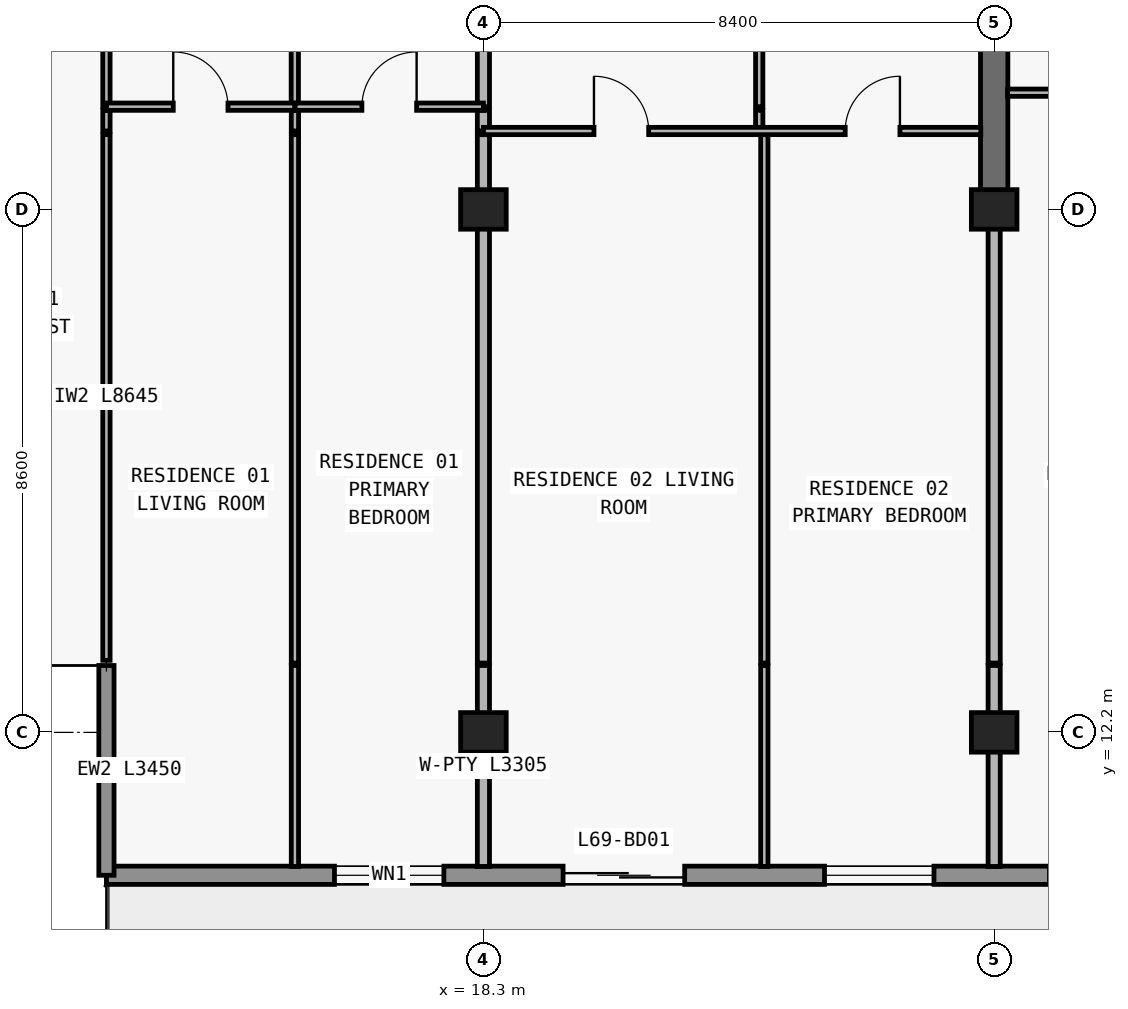
"""IFC4 building model, lengths in metres.
Left out: names, types, materials, properties, quantities, classifications, styles, units other than length and angle.
Written with IfcOpenShell. Run it as: python <this file> out.ifc"""

import sys

from ifc_helpers import new_model, si_unit, direction, frame, frame_2d, origin, origin_2d, place, context, subcontext, project, spatial, rectangle, extrude, element, fill, save


model = new_model("IFC4")
c1 = context("Model", 3, precision=1e-05, world=origin(), true_north=direction((0.0, 1.0)))
c2 = subcontext(c1, "Body", "Model", "MODEL_VIEW")
j1 = project(units=[si_unit("LENGTHUNIT", "METRE"), si_unit("PLANEANGLEUNIT", "RADIAN")], contexts=[c1])
p1 = place(None, origin())
s1 = spatial("IfcSite", under=j1, at=p1, CompositionType="ELEMENT")
p2 = place(p1, origin())
s2 = spatial("IfcBuilding", under=s1, at=p2, CompositionType="ELEMENT")
p3 = place(p2, frame((0.0, 0.0, 246.3)))
s3 = spatial("IfcBuildingStorey", under=s2, at=p3, CompositionType="ELEMENT", Elevation=246.3)
for number, where, z_axis, x_axis in (
    (1, (18.3, 12.2, 0.0), (0.0, 0.0, 1.0), (1.0, 0.0, 0.0)),
    (2, (26.7, 12.2, 0.0), (0.0, 0.0, 1.0), (1.0, 0.0, 0.0)),
    (3, (18.3, 20.8, 0.0), (0.0, 0.0, 1.0), (1.0, 0.0, 0.0)),
    (4, (26.7, 20.8, 0.0), (0.0, 0.0, 1.0), (1.0, 0.0, 0.0)),
):
    element("IfcColumn", number, at=place(p3, frame(where, z_axis=z_axis, x_axis=x_axis)), inside=s3, PredefinedType="COLUMN", context=c2, shape_type="SweptSolid", body=[
        extrude(rectangle(XDim=0.75, YDim=0.65, at=origin_2d()), origin(), (0.0, 0.0, 1.0), 3.05),
    ])
p4 = place(p3, frame((26.7, 20.8, 0.0), z_axis=(0.0, 0.0, 1.0), x_axis=(0.0, 1.0, 0.0)))
e5 = element("IfcWall", 5, at=p4, inside=s3, PredefinedType="SHEAR", context=c2, shape_type="SweptSolid", body=[
    extrude(rectangle(XDim=8.6, YDim=0.45, at=frame_2d((4.3, 0.0))), origin(), (0.0, 0.0, 1.0), 3.05),
])
p5 = place(p3, frame((65.7, 9.85, 0.0), z_axis=(0.0, 0.0, 1.0), x_axis=(-1.0, 0.0, 0.0)))
e6 = element("IfcWall", 6, at=p5, inside=s3, PredefinedType="STANDARD", context=c2, shape_type="SweptSolid", body=[
    extrude(rectangle(XDim=53.6, YDim=0.3, at=frame_2d((26.8, 0.0))), origin(), (0.0, 0.0, 1.0), 3.05),
])
p6 = place(p5, frame((48.05, 0.0, 0.85)))
e7 = element("IfcOpeningElement", 7, at=p6, cuts=e6, PredefinedType="OPENING", context=c2, shape_type="SweptSolid", body=[
    extrude(rectangle(XDim=1.8, YDim=1.55, at=frame_2d((0.9, 0.775))), frame((0.0, 0.16, 0.0), z_axis=(0.0, -1.0, 0.0), x_axis=(1.0, 0.0, 0.0)), (0.0, 0.0, 1.0), 0.32),
])
p7 = place(p5, frame((44.09, 0.0, 0.0)))
e8 = element("IfcOpeningElement", 8, at=p7, cuts=e6, PredefinedType="OPENING", context=c2, shape_type="SweptSolid", body=[
    extrude(rectangle(XDim=2.0, YDim=2.3, at=frame_2d((1.0, 1.15))), frame((0.0, 0.16, 0.0), z_axis=(0.0, -1.0, 0.0), x_axis=(1.0, 0.0, 0.0)), (0.0, 0.0, 1.0), 0.32),
])
p8 = place(p5, frame((39.99, 0.0, 0.85)))
e9 = element("IfcOpeningElement", 9, at=p8, cuts=e6, PredefinedType="OPENING", context=c2, shape_type="SweptSolid", body=[
    extrude(rectangle(XDim=1.8, YDim=1.55, at=frame_2d((0.9, 0.775))), frame((0.0, 0.16, 0.0), z_axis=(0.0, -1.0, 0.0), x_axis=(1.0, 0.0, 0.0)), (0.0, 0.0, 1.0), 0.32),
])
p9 = place(p5, frame((36.09, 0.0, 0.0)))
e10 = element("IfcOpeningElement", 10, at=p9, cuts=e6, PredefinedType="OPENING", context=c2, shape_type="SweptSolid", body=[
    extrude(rectangle(XDim=2.0, YDim=2.3, at=frame_2d((1.0, 1.15))), frame((0.0, 0.16, 0.0), z_axis=(0.0, -1.0, 0.0), x_axis=(1.0, 0.0, 0.0)), (0.0, 0.0, 1.0), 0.32),
])
p10 = place(p5, frame((31.41, 0.0, 0.65)))
e11 = element("IfcOpeningElement", 11, at=p10, cuts=e6, PredefinedType="OPENING", context=c2, shape_type="SweptSolid", body=[
    extrude(rectangle(XDim=2.6, YDim=1.85, at=frame_2d((1.3, 0.925))), frame((0.0, 0.16, 0.0), z_axis=(0.0, -1.0, 0.0), x_axis=(1.0, 0.0, 0.0)), (0.0, 0.0, 1.0), 0.32),
])
p11 = place(p5, frame((25.7, 0.0, 0.85)))
e12 = element("IfcOpeningElement", 12, at=p11, cuts=e6, PredefinedType="OPENING", context=c2, shape_type="SweptSolid", body=[
    extrude(rectangle(XDim=2.2, YDim=1.55, at=frame_2d((1.1, 0.775))), frame((0.0, 0.16, 0.0), z_axis=(0.0, -1.0, 0.0), x_axis=(1.0, 0.0, 0.0)), (0.0, 0.0, 1.0), 0.32),
])
p12 = place(p5, frame((17.7, 0.0, 0.85)))
e13 = element("IfcOpeningElement", 13, at=p12, cuts=e6, PredefinedType="OPENING", context=c2, shape_type="SweptSolid", body=[
    extrude(rectangle(XDim=2.2, YDim=1.55, at=frame_2d((1.1, 0.775))), frame((0.0, 0.16, 0.0), z_axis=(0.0, -1.0, 0.0), x_axis=(1.0, 0.0, 0.0)), (0.0, 0.0, 1.0), 0.32),
])
p13 = place(p5, frame((11.29, 0.0, 0.0)))
e14 = element("IfcOpeningElement", 14, at=p13, cuts=e6, PredefinedType="OPENING", context=c2, shape_type="SweptSolid", body=[
    extrude(rectangle(XDim=2.0, YDim=2.3, at=frame_2d((1.0, 1.15))), frame((0.0, 0.16, 0.0), z_axis=(0.0, -1.0, 0.0), x_axis=(1.0, 0.0, 0.0)), (0.0, 0.0, 1.0), 0.32),
])
p14 = place(p5, frame((7.19, 0.0, 0.85)))
e15 = element("IfcOpeningElement", 15, at=p14, cuts=e6, PredefinedType="OPENING", context=c2, shape_type="SweptSolid", body=[
    extrude(rectangle(XDim=1.8, YDim=1.55, at=frame_2d((0.9, 0.775))), frame((0.0, 0.16, 0.0), z_axis=(0.0, -1.0, 0.0), x_axis=(1.0, 0.0, 0.0)), (0.0, 0.0, 1.0), 0.32),
])
p15 = place(p5, frame((0.65, 0.0, 0.85)))
e16 = element("IfcOpeningElement", 16, at=p15, cuts=e6, PredefinedType="OPENING", context=c2, shape_type="SweptSolid", body=[
    extrude(rectangle(XDim=1.8, YDim=1.55, at=frame_2d((0.9, 0.775))), frame((0.0, 0.16, 0.0), z_axis=(0.0, -1.0, 0.0), x_axis=(1.0, 0.0, 0.0)), (0.0, 0.0, 1.0), 0.32),
])
p16 = place(p3, frame((12.1, 13.3, 0.0), z_axis=(0.0, 0.0, 1.0), x_axis=(0.0, -1.0, 0.0)))
e17 = element("IfcWall", 17, at=p16, inside=s3, PredefinedType="ELEMENTEDWALL", context=c2, shape_type="SweptSolid", body=[
    extrude(rectangle(XDim=3.45, YDim=0.25, at=frame_2d((1.725, 0.0))), origin(), (0.0, 0.0, 1.0), 3.05),
])
p17 = place(p3, frame((12.1, 13.385, 0.0), z_axis=(0.0, 0.0, 1.0), x_axis=(0.0, 1.0, 0.0)))
e18 = element("IfcWall", 18, at=p17, inside=s3, PredefinedType="PARTITIONING", context=c2, shape_type="SweptSolid", body=[
    extrude(rectangle(XDim=8.645, YDim=0.12, at=frame_2d((4.323, 0.0))), origin(), (0.0, 0.0, 1.0), 2.725),
])
p18 = place(p3, frame((12.1, 22.09, 0.0), z_axis=(0.0, 0.0, 1.0), x_axis=(0.0, 1.0, 0.0)))
e19 = element("IfcWall", 19, at=p18, inside=s3, PredefinedType="PARTITIONING", context=c2, shape_type="SweptSolid", body=[
    extrude(rectangle(XDim=0.34, YDim=0.12, at=frame_2d((0.17, 0.0))), origin(), (0.0, 0.0, 1.0), 2.725),
])
p19 = place(p3, frame((12.1, 22.49, 0.0), z_axis=(0.0, 0.0, 1.0), x_axis=(0.0, 1.0, 0.0)))
e20 = element("IfcWall", 20, at=p19, inside=s3, PredefinedType="PARTITIONING", context=c2, shape_type="SweptSolid", body=[
    extrude(rectangle(XDim=4.69, YDim=0.12, at=frame_2d((2.345, 0.0))), origin(), (0.0, 0.0, 1.0), 2.725),
])
p20 = place(p19, frame((1.895, 0.0, 0.0)))
e21 = element("IfcOpeningElement", 21, at=p20, cuts=e20, PredefinedType="OPENING", context=c2, shape_type="SweptSolid", body=[
    extrude(rectangle(XDim=0.9, YDim=2.15, at=frame_2d((0.45, 1.075))), frame((0.0, 0.07, 0.0), z_axis=(0.0, -1.0, 0.0), x_axis=(1.0, 0.0, 0.0)), (0.0, 0.0, 1.0), 0.14),
])
p21 = place(p3, frame((15.198, 22.49, 0.0), z_axis=(0.0, 0.0, 1.0), x_axis=(0.0, 1.0, 0.0)))
e22 = element("IfcWall", 22, at=p21, inside=s3, PredefinedType="PARTITIONING", context=c2, shape_type="SweptSolid", body=[
    extrude(rectangle(XDim=4.69, YDim=0.12, at=frame_2d((2.345, 0.0))), origin(), (0.0, 0.0, 1.0), 3.05),
])
p22 = place(p21, frame((1.895, 0.0, 0.0)))
e23 = element("IfcOpeningElement", 23, at=p22, cuts=e22, PredefinedType="OPENING", context=c2, shape_type="SweptSolid", body=[
    extrude(rectangle(XDim=0.9, YDim=2.15, at=frame_2d((0.45, 1.075))), frame((0.0, 0.07, 0.0), z_axis=(0.0, -1.0, 0.0), x_axis=(1.0, 0.0, 0.0)), (0.0, 0.0, 1.0), 0.14),
])
p23 = place(p3, frame((15.2, 9.995, 0.0), z_axis=(0.0, 0.0, 1.0), x_axis=(0.0, 1.0, 0.0)))
e24 = element("IfcWall", 24, at=p23, inside=s3, PredefinedType="PARTITIONING", context=c2, shape_type="SweptSolid", body=[
    extrude(rectangle(XDim=3.305, YDim=0.12, at=frame_2d((1.652, 0.0))), origin(), (0.0, 0.0, 1.0), 3.05),
])
p24 = place(p3, frame((15.2, 13.34, 0.0), z_axis=(0.0, 0.0, 1.0), x_axis=(0.0, 1.0, 0.0)))
e25 = element("IfcWall", 25, at=p24, inside=s3, PredefinedType="PARTITIONING", context=c2, shape_type="SweptSolid", body=[
    extrude(rectangle(XDim=8.69, YDim=0.12, at=frame_2d((4.345, 0.0))), origin(), (0.0, 0.0, 1.0), 3.05),
])
p25 = place(p3, frame((15.2, 22.09, 0.0), z_axis=(0.0, 0.0, 1.0), x_axis=(0.0, 1.0, 0.0)))
e26 = element("IfcWall", 26, at=p25, inside=s3, PredefinedType="PARTITIONING", context=c2, shape_type="SweptSolid", body=[
    extrude(rectangle(XDim=0.34, YDim=0.12, at=frame_2d((0.17, 0.0))), origin(), (0.0, 0.0, 1.0), 3.05),
])
p26 = place(p3, frame((18.3, 9.995, 0.0), z_axis=(0.0, 0.0, 1.0), x_axis=(0.0, 1.0, 0.0)))
e27 = element("IfcWall", 27, at=p26, inside=s3, PredefinedType="PARTITIONING", context=c2, shape_type="SweptSolid", body=[
    extrude(rectangle(XDim=3.305, YDim=0.2, at=frame_2d((1.652, 0.0))), origin(), (0.0, 0.0, 1.0), 2.263),
])
p27 = place(p3, frame((18.3, 13.34, 0.0), z_axis=(0.0, 0.0, 1.0), x_axis=(0.0, 1.0, 0.0)))
e28 = element("IfcWall", 28, at=p27, inside=s3, PredefinedType="PARTITIONING", context=c2, shape_type="SweptSolid", body=[
    extrude(rectangle(XDim=8.69, YDim=0.2, at=frame_2d((4.345, 0.0))), origin(), (0.0, 0.0, 1.0), 2.263),
])
p28 = place(p3, frame((18.3, 22.09, 0.0), z_axis=(0.0, 0.0, 1.0), x_axis=(0.0, 1.0, 0.0)))
e29 = element("IfcWall", 29, at=p28, inside=s3, PredefinedType="PARTITIONING", context=c2, shape_type="SweptSolid", body=[
    extrude(rectangle(XDim=0.34, YDim=0.2, at=frame_2d((0.17, 0.0))), origin(), (0.0, 0.0, 1.0), 2.263),
])
p29 = place(p3, frame((18.3, 22.49, 0.0), z_axis=(0.0, 0.0, 1.0), x_axis=(0.0, 1.0, 0.0)))
e30 = element("IfcWall", 30, at=p29, inside=s3, PredefinedType="PARTITIONING", context=c2, shape_type="SweptSolid", body=[
    extrude(rectangle(XDim=4.69, YDim=0.2, at=frame_2d((2.345, 0.0))), origin(), (0.0, 0.0, 1.0), 2.263),
])
p30 = place(p3, frame((22.836, 22.09, 0.0), z_axis=(0.0, 0.0, 1.0), x_axis=(0.0, 1.0, 0.0)))
e31 = element("IfcWall", 31, at=p30, inside=s3, PredefinedType="PARTITIONING", context=c2, shape_type="SweptSolid", body=[
    extrude(rectangle(XDim=0.34, YDim=0.12, at=frame_2d((0.17, 0.0))), origin(), (0.0, 0.0, 1.0), 3.05),
])
p31 = place(p3, frame((22.836, 22.49, 0.0), z_axis=(0.0, 0.0, 1.0), x_axis=(0.0, 1.0, 0.0)))
e32 = element("IfcWall", 32, at=p31, inside=s3, PredefinedType="PARTITIONING", context=c2, shape_type="SweptSolid", body=[
    extrude(rectangle(XDim=4.69, YDim=0.12, at=frame_2d((2.345, 0.0))), origin(), (0.0, 0.0, 1.0), 3.05),
])
p32 = place(p31, frame((1.895, 0.0, 0.0)))
e33 = element("IfcOpeningElement", 33, at=p32, cuts=e32, PredefinedType="OPENING", context=c2, shape_type="SweptSolid", body=[
    extrude(rectangle(XDim=0.9, YDim=2.15, at=frame_2d((0.45, 1.075))), frame((0.0, 0.07, 0.0), z_axis=(0.0, -1.0, 0.0), x_axis=(1.0, 0.0, 0.0)), (0.0, 0.0, 1.0), 0.14),
])
p33 = place(p3, frame((22.92, 9.995, 0.0), z_axis=(0.0, 0.0, 1.0), x_axis=(0.0, 1.0, 0.0)))
e34 = element("IfcWall", 34, at=p33, inside=s3, PredefinedType="PARTITIONING", context=c2, shape_type="SweptSolid", body=[
    extrude(rectangle(XDim=3.305, YDim=0.12, at=frame_2d((1.652, 0.0))), origin(), (0.0, 0.0, 1.0), 3.05),
])
p34 = place(p3, frame((22.92, 13.34, 0.0), z_axis=(0.0, 0.0, 1.0), x_axis=(0.0, 1.0, 0.0)))
e35 = element("IfcWall", 35, at=p34, inside=s3, PredefinedType="PARTITIONING", context=c2, shape_type="SweptSolid", body=[
    extrude(rectangle(XDim=8.69, YDim=0.12, at=frame_2d((4.345, 0.0))), origin(), (0.0, 0.0, 1.0), 3.05),
])
p35 = place(p3, frame((26.7, 9.995, 0.0), z_axis=(0.0, 0.0, 1.0), x_axis=(0.0, 1.0, 0.0)))
e36 = element("IfcWall", 36, at=p35, inside=s3, PredefinedType="PARTITIONING", context=c2, shape_type="SweptSolid", body=[
    extrude(rectangle(XDim=3.305, YDim=0.2, at=frame_2d((1.652, 0.0))), origin(), (0.0, 0.0, 1.0), 2.263),
])
p36 = place(p3, frame((26.7, 13.34, 0.0), z_axis=(0.0, 0.0, 1.0), x_axis=(0.0, 1.0, 0.0)))
e37 = element("IfcWall", 37, at=p36, inside=s3, PredefinedType="PARTITIONING", context=c2, shape_type="SweptSolid", body=[
    extrude(rectangle(XDim=7.455, YDim=0.2, at=frame_2d((3.728, 0.0))), origin(), (0.0, 0.0, 1.0), 2.263),
])
p37 = place(p3, frame((18.3, 22.09, 0.0), z_axis=(0.0, 0.0, 1.0), x_axis=(1.0, 0.0, 0.0)))
e38 = element("IfcWall", 38, at=p37, inside=s3, PredefinedType="PARTITIONING", context=c2, shape_type="SweptSolid", body=[
    extrude(rectangle(XDim=8.18, YDim=0.12, at=frame_2d((4.09, 0.0))), origin(), (0.0, 0.0, 1.0), 3.05),
])
p38 = place(p37, frame((1.818, 0.0, 0.0)))
e39 = element("IfcOpeningElement", 39, at=p38, cuts=e38, PredefinedType="OPENING", context=c2, shape_type="SweptSolid", body=[
    extrude(rectangle(XDim=0.9, YDim=2.15, at=frame_2d((0.45, 1.075))), frame((0.0, 0.07, 0.0), z_axis=(0.0, -1.0, 0.0), x_axis=(1.0, 0.0, 0.0)), (0.0, 0.0, 1.0), 0.14),
])
p39 = place(p37, frame((5.95, 0.0, 0.0)))
e40 = element("IfcOpeningElement", 40, at=p39, cuts=e38, PredefinedType="OPENING", context=c2, shape_type="SweptSolid", body=[
    extrude(rectangle(XDim=0.9, YDim=2.15, at=frame_2d((0.45, 1.075))), frame((0.0, 0.07, 0.0), z_axis=(0.0, -1.0, 0.0), x_axis=(1.0, 0.0, 0.0)), (0.0, 0.0, 1.0), 0.14),
])
p40 = place(p3, frame((12.1, 22.49, 0.0), z_axis=(0.0, 0.0, 1.0), x_axis=(1.0, 0.0, 0.0)))
e41 = element("IfcWall", 41, at=p40, inside=s3, PredefinedType="PARTITIONING", context=c2, shape_type="SweptSolid", body=[
    extrude(rectangle(XDim=3.098, YDim=0.12, at=frame_2d((1.549, 0.0))), origin(), (0.0, 0.0, 1.0), 3.05),
])
p41 = place(p40, frame((1.099, 0.0, 0.0)))
e42 = element("IfcOpeningElement", 42, at=p41, cuts=e41, PredefinedType="OPENING", context=c2, shape_type="SweptSolid", body=[
    extrude(rectangle(XDim=0.9, YDim=2.15, at=frame_2d((0.45, 1.075))), frame((0.0, 0.07, 0.0), z_axis=(0.0, -1.0, 0.0), x_axis=(1.0, 0.0, 0.0)), (0.0, 0.0, 1.0), 0.14),
])
p42 = place(p3, frame((15.203, 22.49, 0.0), z_axis=(0.0, 0.0, 1.0), x_axis=(1.0, 0.0, 0.0)))
e43 = element("IfcWall", 43, at=p42, inside=s3, PredefinedType="PARTITIONING", context=c2, shape_type="SweptSolid", body=[
    extrude(rectangle(XDim=3.097, YDim=0.12, at=frame_2d((1.549, 0.0))), origin(), (0.0, 0.0, 1.0), 3.05),
])
p43 = place(p42, frame((1.098, 0.0, 0.0)))
e44 = element("IfcOpeningElement", 44, at=p43, cuts=e43, PredefinedType="OPENING", context=c2, shape_type="SweptSolid", body=[
    extrude(rectangle(XDim=0.9, YDim=2.15, at=frame_2d((0.45, 1.075))), frame((0.0, 0.07, 0.0), z_axis=(0.0, -1.0, 0.0), x_axis=(1.0, 0.0, 0.0)), (0.0, 0.0, 1.0), 0.14),
])
p44 = place(p3, frame((26.92, 22.72, 0.0), z_axis=(0.0, 0.0, 1.0), x_axis=(1.0, 0.0, 0.0)))
e45 = element("IfcWall", 45, at=p44, inside=s3, PredefinedType="PARTITIONING", context=c2, shape_type="SweptSolid", body=[
    extrude(rectangle(XDim=8.18, YDim=0.12, at=frame_2d((4.09, 0.0))), origin(), (0.0, 0.0, 1.0), 3.05),
])
p45 = place(p44, frame((1.33, 0.0, 0.0)))
e46 = element("IfcOpeningElement", 46, at=p45, cuts=e45, PredefinedType="OPENING", context=c2, shape_type="SweptSolid", body=[
    extrude(rectangle(XDim=0.9, YDim=2.15, at=frame_2d((0.45, 1.075))), frame((0.0, 0.07, 0.0), z_axis=(0.0, -1.0, 0.0), x_axis=(1.0, 0.0, 0.0)), (0.0, 0.0, 1.0), 0.14),
])
p46 = place(p6, origin())
e47 = element("IfcWindow", 47, at=p46, inside=s3, PartitioningType="SINGLE_PANEL", PredefinedType="WINDOW", context=c2, shape_type="SweptSolid", body=[
    extrude(rectangle(XDim=1.8, YDim=1.55, at=frame_2d((0.9, 0.775))), frame((0.0, 0.03, 0.0), z_axis=(0.0, -1.0, 0.0), x_axis=(1.0, 0.0, 0.0)), (0.0, 0.0, 1.0), 0.06),
])
fill(e7, e47)
p47 = place(p7, origin())
e48 = element("IfcDoor", 48, at=p47, inside=s3, OperationType="DOUBLE_DOOR_SLIDING", PredefinedType="DOOR", context=c2, shape_type="SweptSolid", body=[
    extrude(rectangle(XDim=2.0, YDim=2.3, at=frame_2d((1.0, 1.15))), frame((0.0, 0.025, 0.0), z_axis=(0.0, -1.0, 0.0), x_axis=(1.0, 0.0, 0.0)), (0.0, 0.0, 1.0), 0.05),
])
fill(e8, e48)
p48 = place(p8, origin())
e49 = element("IfcWindow", 49, at=p48, inside=s3, PartitioningType="SINGLE_PANEL", PredefinedType="WINDOW", context=c2, shape_type="SweptSolid", body=[
    extrude(rectangle(XDim=1.8, YDim=1.55, at=frame_2d((0.9, 0.775))), frame((0.0, 0.03, 0.0), z_axis=(0.0, -1.0, 0.0), x_axis=(1.0, 0.0, 0.0)), (0.0, 0.0, 1.0), 0.06),
])
fill(e9, e49)
p49 = place(p41, origin())
e50 = element("IfcDoor", 50, at=p49, inside=s3, OperationType="SINGLE_SWING_LEFT", PredefinedType="DOOR", context=c2, shape_type="SweptSolid", body=[
    extrude(rectangle(XDim=0.9, YDim=2.15, at=frame_2d((0.45, 1.075))), frame((0.0, 0.025, 0.0), z_axis=(0.0, -1.0, 0.0), x_axis=(1.0, 0.0, 0.0)), (0.0, 0.0, 1.0), 0.05),
])
fill(e42, e50)
p50 = place(p43, origin())
e51 = element("IfcDoor", 51, at=p50, inside=s3, OperationType="SINGLE_SWING_RIGHT", PredefinedType="DOOR", context=c2, shape_type="SweptSolid", body=[
    extrude(rectangle(XDim=0.9, YDim=2.15, at=frame_2d((0.45, 1.075))), frame((0.0, 0.025, 0.0), z_axis=(0.0, -1.0, 0.0), x_axis=(1.0, 0.0, 0.0)), (0.0, 0.0, 1.0), 0.05),
])
fill(e44, e51)
p51 = place(p38, origin())
e52 = element("IfcDoor", 52, at=p51, inside=s3, OperationType="SINGLE_SWING_LEFT", PredefinedType="DOOR", context=c2, shape_type="SweptSolid", body=[
    extrude(rectangle(XDim=0.9, YDim=2.15, at=frame_2d((0.45, 1.075))), frame((0.0, 0.025, 0.0), z_axis=(0.0, -1.0, 0.0), x_axis=(1.0, 0.0, 0.0)), (0.0, 0.0, 1.0), 0.05),
])
fill(e39, e52)
p52 = place(p39, origin())
e53 = element("IfcDoor", 53, at=p52, inside=s3, OperationType="SINGLE_SWING_RIGHT", PredefinedType="DOOR", context=c2, shape_type="SweptSolid", body=[
    extrude(rectangle(XDim=0.9, YDim=2.15, at=frame_2d((0.45, 1.075))), frame((0.0, 0.025, 0.0), z_axis=(0.0, -1.0, 0.0), x_axis=(1.0, 0.0, 0.0)), (0.0, 0.0, 1.0), 0.05),
])
fill(e40, e53)
save(model, sys.argv[1])
